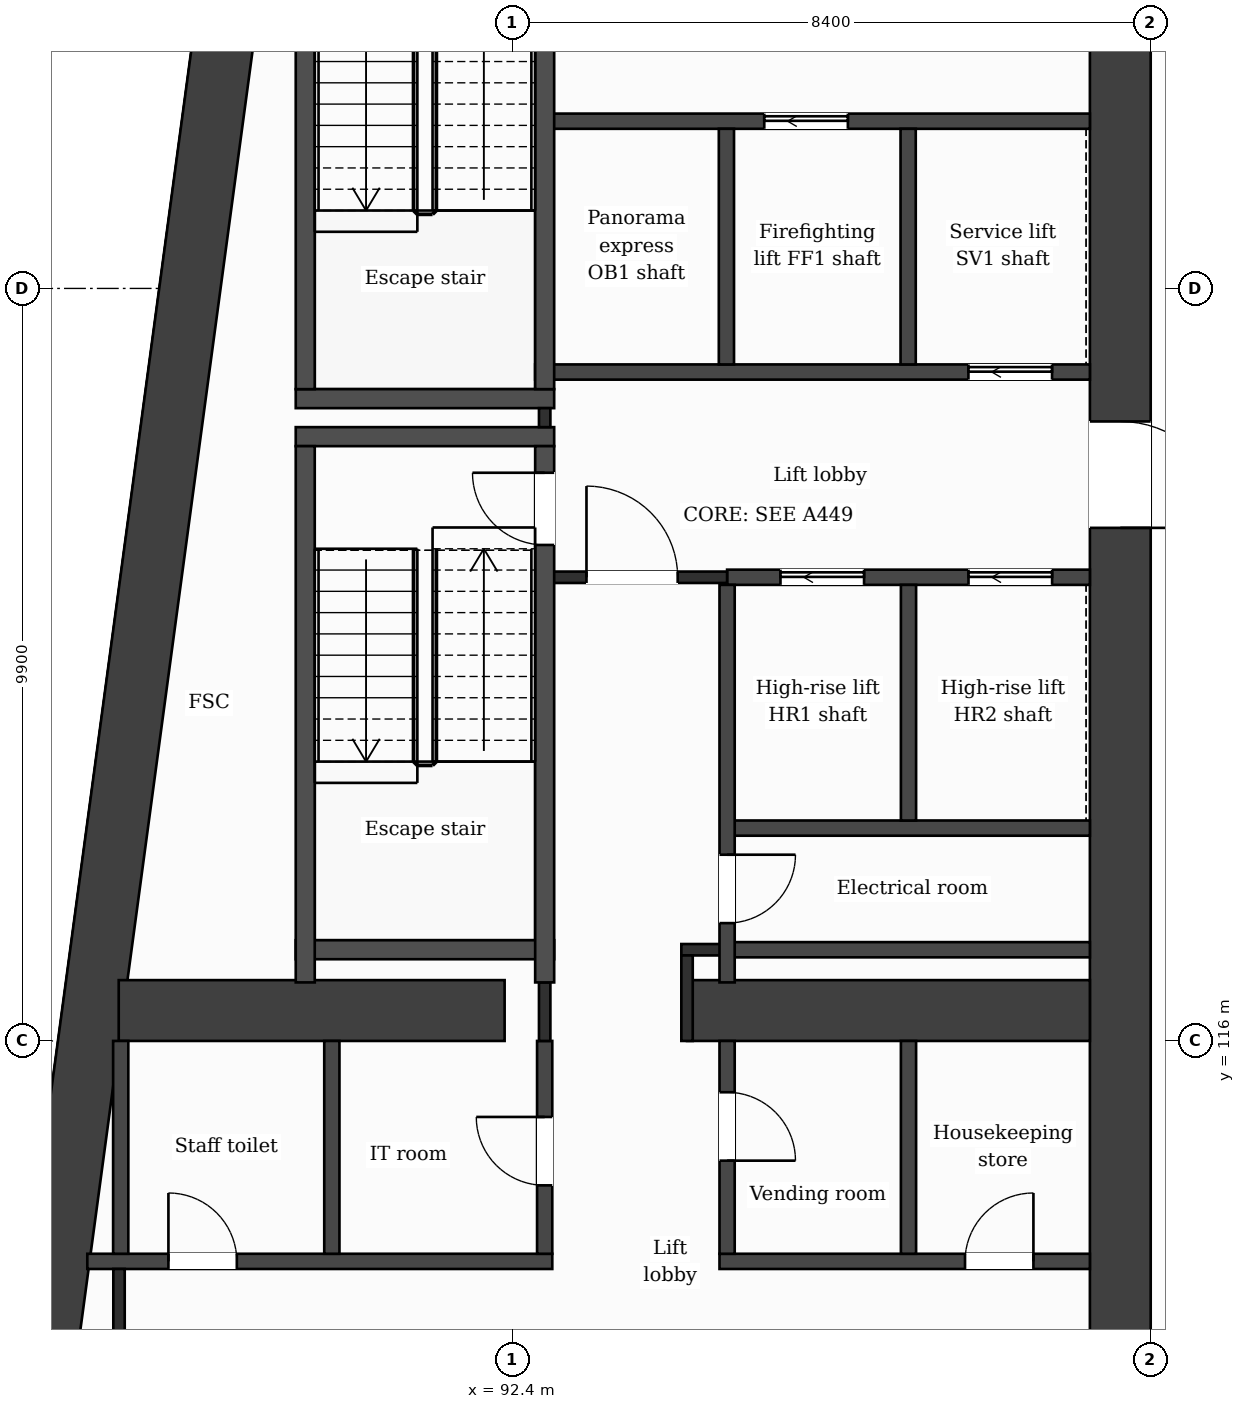
"""IFC4 building model, lengths in metres.
Left out: names, types, materials, properties, quantities, classifications, styles, units other than length and angle.
Written with IfcOpenShell. Run it as: python <this file> out.ifc"""

import sys

from ifc_helpers import new_model, si_unit, direction, frame, frame_2d, origin, place, context, subcontext, project, spatial, rectangle, extrude, element, fill, save


model = new_model("IFC4")
c1 = context("Model", 3, precision=1e-05, world=origin(), true_north=direction((0.0, 1.0)))
c2 = subcontext(c1, "Body", "Model", "MODEL_VIEW")
j1 = project(units=[si_unit("LENGTHUNIT", "METRE"), si_unit("PLANEANGLEUNIT", "RADIAN")], contexts=[c1])
p1 = place(None, origin())
s1 = spatial("IfcSite", under=j1, at=p1, CompositionType="ELEMENT")
p2 = place(p1, origin())
s2 = spatial("IfcBuilding", under=s1, at=p2, CompositionType="ELEMENT")
p3 = place(p2, frame((0.0, 0.0, 202.2)))
s3 = spatial("IfcBuildingStorey", under=s2, at=p3, CompositionType="ELEMENT", Elevation=202.2)
p4 = place(p3, frame((100.4, 132.0, 0.0), z_axis=(0.0, 0.0, 1.0), x_axis=(0.0, -1.0, 0.0)))
e1 = element("IfcWall", 1, at=p4, inside=s3, PredefinedType="SHEAR", context=c2, shape_type="SweptSolid", body=[
    extrude(rectangle(XDim=21.2, YDim=0.8, at=frame_2d((10.6, 0.0))), origin(), (0.0, 0.0, 1.0), 3.7),
])
p5 = place(p4, frame((7.85, 0.0, 0.0)))
e2 = element("IfcOpeningElement", 2, at=p5, cuts=e1, PredefinedType="OPENING", context=c2, shape_type="SweptSolid", body=[
    extrude(rectangle(XDim=1.4, YDim=2.1, at=frame_2d((0.7, 1.05))), frame((0.0, 0.41, 0.0), z_axis=(0.0, -1.0, 0.0), x_axis=(1.0, 0.0, 0.0)), (0.0, 0.0, 1.0), 0.82),
])
p6 = place(p3, frame((86.127, 110.8, 0.0), z_axis=(0.0, 0.0, 1.0), x_axis=(0.133408347329, 0.991061154956, 0.0)))
e3 = element("IfcWall", 3, at=p6, inside=s3, PredefinedType="SHEAR", context=c2, shape_type="SweptSolid", body=[
    extrude(rectangle(XDim=21.391, YDim=0.8, at=frame_2d((10.696, 0.0))), origin(), (0.0, 0.0, 1.0), 3.7),
])
p7 = place(p3, frame((87.223, 116.4, 0.0), z_axis=(0.0, 0.0, 1.0), x_axis=(1.0, 0.0, 0.0)))
e4 = element("IfcWall", 4, at=p7, inside=s3, PredefinedType="SHEAR", context=c2, shape_type="SweptSolid", body=[
    extrude(rectangle(XDim=5.077, YDim=0.8, at=frame_2d((2.539, 0.0))), origin(), (0.0, 0.0, 1.0), 3.7),
])
p8 = place(p3, frame((94.7, 116.4, 0.0), z_axis=(0.0, 0.0, 1.0), x_axis=(1.0, 0.0, 0.0)))
e5 = element("IfcWall", 5, at=p8, inside=s3, PredefinedType="SHEAR", context=c2, shape_type="SweptSolid", body=[
    extrude(rectangle(XDim=5.3, YDim=0.8, at=frame_2d((2.65, 0.0))), origin(), (0.0, 0.0, 1.0), 3.7),
])
p9 = place(p3, frame((86.81, 113.1, 0.0), z_axis=(0.0, 0.0, 1.0), x_axis=(1.0, 0.0, 0.0)))
e6 = element("IfcWall", 6, at=p9, inside=s3, PredefinedType="PARTITIONING", context=c2, shape_type="SweptSolid", body=[
    extrude(rectangle(XDim=6.117, YDim=0.2, at=frame_2d((3.059, 0.0))), origin(), (0.0, 0.0, 1.0), 3.38),
])
p10 = place(p9, frame((1.067, 0.0, 0.0)))
e7 = element("IfcOpeningElement", 7, at=p10, cuts=e6, PredefinedType="OPENING", context=c2, shape_type="SweptSolid", body=[
    extrude(rectangle(XDim=0.9, YDim=2.1, at=frame_2d((0.45, 1.05))), frame((0.0, 0.11, 0.0), z_axis=(0.0, -1.0, 0.0), x_axis=(1.0, 0.0, 0.0)), (0.0, 0.0, 1.0), 0.22),
])
p11 = place(p3, frame((95.127, 113.1, 0.0), z_axis=(0.0, 0.0, 1.0), x_axis=(1.0, 0.0, 0.0)))
e8 = element("IfcWall", 8, at=p11, inside=s3, PredefinedType="PARTITIONING", context=c2, shape_type="SweptSolid", body=[
    extrude(rectangle(XDim=4.873, YDim=0.2, at=frame_2d((2.437, 0.0))), origin(), (0.0, 0.0, 1.0), 3.38),
])
p12 = place(p11, frame((3.23, 0.0, 0.0)))
e9 = element("IfcOpeningElement", 9, at=p12, cuts=e8, PredefinedType="OPENING", context=c2, shape_type="SweptSolid", body=[
    extrude(rectangle(XDim=0.9, YDim=2.1, at=frame_2d((0.45, 1.05))), frame((0.0, 0.11, 0.0), z_axis=(0.0, -1.0, 0.0), x_axis=(1.0, 0.0, 0.0)), (0.0, 0.0, 1.0), 0.22),
])
p13 = place(p3, frame((95.227, 117.2, 0.0), z_axis=(0.0, 0.0, 1.0), x_axis=(1.0, 0.0, 0.0)))
e10 = element("IfcWall", 10, at=p13, inside=s3, PredefinedType="PARTITIONING", context=c2, shape_type="SweptSolid", body=[
    extrude(rectangle(XDim=4.773, YDim=0.2, at=frame_2d((2.386, 0.0))), origin(), (0.0, 0.0, 1.0), 3.38),
])
p14 = place(p3, frame((94.625, 117.2, 0.0), z_axis=(0.0, 0.0, 1.0), x_axis=(1.0, 0.0, 0.0)))
e11 = element("IfcWall", 11, at=p14, inside=s3, PredefinedType="PARTITIONING", context=c2, shape_type="SweptSolid", body=[
    extrude(rectangle(XDim=0.602, YDim=0.15, at=frame_2d((0.301, 0.0))), origin(), (0.0, 0.0, 1.0), 3.38),
])
p15 = place(p3, frame((89.552, 117.2, 0.0), z_axis=(0.0, 0.0, 1.0), x_axis=(1.0, 0.0, 0.0)))
e12 = element("IfcWall", 12, at=p15, inside=s3, PredefinedType="PARTITIONING", context=c2, shape_type="SweptSolid", body=[
    extrude(rectangle(XDim=3.4, YDim=0.25, at=frame_2d((1.7, 0.0))), origin(), (0.0, 0.0, 1.0), 3.38),
])
p16 = place(p3, frame((95.227, 118.8, 0.0), z_axis=(0.0, 0.0, 1.0), x_axis=(1.0, 0.0, 0.0)))
e13 = element("IfcWall", 13, at=p16, inside=s3, PredefinedType="PARTITIONING", context=c2, shape_type="SweptSolid", body=[
    extrude(rectangle(XDim=4.773, YDim=0.2, at=frame_2d((2.386, 0.0))), origin(), (0.0, 0.0, 1.0), 3.38),
])
p17 = place(p3, frame((95.227, 122.1, 0.0), z_axis=(0.0, 0.0, 1.0), x_axis=(1.0, 0.0, 0.0)))
e14 = element("IfcWall", 14, at=p17, inside=s3, PredefinedType="PARTITIONING", context=c2, shape_type="SweptSolid", body=[
    extrude(rectangle(XDim=4.773, YDim=0.2, at=frame_2d((2.386, 0.0))), origin(), (0.0, 0.0, 1.0), 3.38),
])
p18 = place(p17, frame((0.702, 0.0, 0.0)))
e15 = element("IfcOpeningElement", 15, at=p18, cuts=e14, PredefinedType="OPENING", context=c2, shape_type="SweptSolid", body=[
    extrude(rectangle(XDim=1.1, YDim=2.1, at=frame_2d((0.55, 1.05))), frame((0.0, 0.11, 0.0), z_axis=(0.0, -1.0, 0.0), x_axis=(1.0, 0.0, 0.0)), (0.0, 0.0, 1.0), 0.22),
])
p19 = place(p17, frame((3.176, 0.0, 0.0)))
e16 = element("IfcOpeningElement", 16, at=p19, cuts=e14, PredefinedType="OPENING", context=c2, shape_type="SweptSolid", body=[
    extrude(rectangle(XDim=1.1, YDim=2.1, at=frame_2d((0.55, 1.05))), frame((0.0, 0.11, 0.0), z_axis=(0.0, -1.0, 0.0), x_axis=(1.0, 0.0, 0.0)), (0.0, 0.0, 1.0), 0.22),
])
p20 = place(p3, frame((92.827, 122.1, 0.0), z_axis=(0.0, 0.0, 1.0), x_axis=(1.0, 0.0, 0.0)))
e17 = element("IfcWall", 17, at=p20, inside=s3, PredefinedType="PARTITIONING", context=c2, shape_type="SweptSolid", body=[
    extrude(rectangle(XDim=2.4, YDim=0.15, at=frame_2d((1.2, 0.0))), origin(), (0.0, 0.0, 1.0), 3.38),
])
p21 = place(p20, frame((0.55, 0.0, 0.0)))
e18 = element("IfcOpeningElement", 18, at=p21, cuts=e17, PredefinedType="OPENING", context=c2, shape_type="SweptSolid", body=[
    extrude(rectangle(XDim=1.2, YDim=2.1, at=frame_2d((0.6, 1.05))), frame((0.0, 0.085, 0.0), z_axis=(0.0, -1.0, 0.0), x_axis=(1.0, 0.0, 0.0)), (0.0, 0.0, 1.0), 0.17),
])
for number, where, z_axis, x_axis in (
    (19, (89.552, 123.95, 0.0), (0.0, 0.0, 1.0), (1.0, 0.0, 0.0)),
    (20, (89.552, 124.45, 0.0), (0.0, 0.0, 1.0), (1.0, 0.0, 0.0)),
):
    element("IfcWall", number, at=place(p3, frame(where, z_axis=z_axis, x_axis=x_axis)), inside=s3, PredefinedType="PARTITIONING", context=c2, shape_type="SweptSolid", body=[
        extrude(rectangle(XDim=3.4, YDim=0.25, at=frame_2d((1.7, 0.0))), origin(), (0.0, 0.0, 1.0), 3.38),
    ])
p22 = place(p3, frame((92.702, 124.8, 0.0), z_axis=(0.0, 0.0, 1.0), x_axis=(1.0, 0.0, 0.0)))
e21 = element("IfcWall", 21, at=p22, inside=s3, PredefinedType="PARTITIONING", context=c2, shape_type="SweptSolid", body=[
    extrude(rectangle(XDim=7.298, YDim=0.2, at=frame_2d((3.649, 0.0))), origin(), (0.0, 0.0, 1.0), 3.38),
])
p23 = place(p22, frame((5.7, 0.0, 0.0)))
e22 = element("IfcOpeningElement", 22, at=p23, cuts=e21, PredefinedType="OPENING", context=c2, shape_type="SweptSolid", body=[
    extrude(rectangle(XDim=1.1, YDim=2.1, at=frame_2d((0.55, 1.05))), frame((0.0, 0.11, 0.0), z_axis=(0.0, -1.0, 0.0), x_axis=(1.0, 0.0, 0.0)), (0.0, 0.0, 1.0), 0.22),
])
p24 = place(p3, frame((92.827, 128.1, 0.0), z_axis=(0.0, 0.0, 1.0), x_axis=(1.0, 0.0, 0.0)))
e23 = element("IfcWall", 23, at=p24, inside=s3, PredefinedType="PARTITIONING", context=c2, shape_type="SweptSolid", body=[
    extrude(rectangle(XDim=7.173, YDim=0.2, at=frame_2d((3.586, 0.0))), origin(), (0.0, 0.0, 1.0), 3.38),
])
p25 = place(p24, frame((2.889, 0.0, 0.0)))
e24 = element("IfcOpeningElement", 24, at=p25, cuts=e23, PredefinedType="OPENING", context=c2, shape_type="SweptSolid", body=[
    extrude(rectangle(XDim=1.1, YDim=2.1, at=frame_2d((0.55, 1.05))), frame((0.0, 0.11, 0.0), z_axis=(0.0, -1.0, 0.0), x_axis=(1.0, 0.0, 0.0)), (0.0, 0.0, 1.0), 0.22),
])
p26 = place(p3, frame((87.25, 113.2, 0.0), z_axis=(0.0, 0.0, 1.0), x_axis=(0.0, 1.0, 0.0)))
e25 = element("IfcWall", 25, at=p26, inside=s3, PredefinedType="PARTITIONING", context=c2, shape_type="SweptSolid", body=[
    extrude(rectangle(XDim=2.8, YDim=0.2, at=frame_2d((1.4, 0.0))), origin(), (0.0, 0.0, 1.0), 3.38),
])
p27 = place(p3, frame((87.227, 111.2, 0.0), z_axis=(0.0, 0.0, 1.0), x_axis=(0.0, 1.0, 0.0)))
e26 = element("IfcWall", 26, at=p27, inside=s3, PredefinedType="PARTITIONING", context=c2, shape_type="SweptSolid", body=[
    extrude(rectangle(XDim=1.8, YDim=0.15, at=frame_2d((0.9, 0.0))), origin(), (0.0, 0.0, 1.0), 3.38),
])
for number, where, z_axis, x_axis in (
    (27, (89.677, 116.77, 0.0), (0.0, 0.0, 1.0), (0.0, 1.0, 0.0)),
    (28, (89.677, 124.575, 0.0), (0.0, 0.0, 1.0), (0.0, 1.0, 0.0)),
):
    element("IfcWall", number, at=place(p3, frame(where, z_axis=z_axis, x_axis=x_axis)), inside=s3, PredefinedType="PARTITIONING", context=c2, shape_type="SweptSolid", body=[
        extrude(rectangle(XDim=7.055, YDim=0.25, at=frame_2d((3.527, 0.0))), origin(), (0.0, 0.0, 1.0), 3.38),
    ])
p28 = place(p3, frame((90.027, 113.2, 0.0), z_axis=(0.0, 0.0, 1.0), x_axis=(0.0, 1.0, 0.0)))
e29 = element("IfcWall", 29, at=p28, inside=s3, PredefinedType="PARTITIONING", context=c2, shape_type="SweptSolid", body=[
    extrude(rectangle(XDim=2.8, YDim=0.2, at=frame_2d((1.4, 0.0))), origin(), (0.0, 0.0, 1.0), 3.38),
])
p29 = place(p3, frame((92.827, 113.2, 0.0), z_axis=(0.0, 0.0, 1.0), x_axis=(0.0, 1.0, 0.0)))
e30 = element("IfcWall", 30, at=p29, inside=s3, PredefinedType="PARTITIONING", context=c2, shape_type="SweptSolid", body=[
    extrude(rectangle(XDim=2.8, YDim=0.2, at=frame_2d((1.4, 0.0))), origin(), (0.0, 0.0, 1.0), 3.38),
])
p30 = place(p29, frame((0.9, 0.0, 0.0)))
e31 = element("IfcOpeningElement", 31, at=p30, cuts=e30, PredefinedType="OPENING", context=c2, shape_type="SweptSolid", body=[
    extrude(rectangle(XDim=0.9, YDim=2.1, at=frame_2d((0.45, 1.05))), frame((0.0, 0.11, 0.0), z_axis=(0.0, -1.0, 0.0), x_axis=(1.0, 0.0, 0.0)), (0.0, 0.0, 1.0), 0.22),
])
p31 = place(p3, frame((92.827, 116.0, 0.0), z_axis=(0.0, 0.0, 1.0), x_axis=(0.0, 1.0, 0.0)))
e32 = element("IfcWall", 32, at=p31, inside=s3, PredefinedType="PARTITIONING", context=c2, shape_type="SweptSolid", body=[
    extrude(rectangle(XDim=0.77, YDim=0.15, at=frame_2d((0.385, 0.0))), origin(), (0.0, 0.0, 1.0), 3.38),
])
p32 = place(p3, frame((92.827, 124.075, 0.0), z_axis=(0.0, 0.0, 1.0), x_axis=(0.0, 1.0, 0.0)))
e33 = element("IfcWall", 33, at=p32, inside=s3, PredefinedType="PARTITIONING", context=c2, shape_type="SweptSolid", body=[
    extrude(rectangle(XDim=0.25, YDim=0.15, at=frame_2d((0.125, 0.0))), origin(), (0.0, 0.0, 1.0), 3.38),
])
p33 = place(p3, frame((92.827, 116.77, 0.0), z_axis=(0.0, 0.0, 1.0), x_axis=(0.0, 1.0, 0.0)))
e34 = element("IfcWall", 34, at=p33, inside=s3, PredefinedType="PARTITIONING", context=c2, shape_type="SweptSolid", body=[
    extrude(rectangle(XDim=7.055, YDim=0.25, at=frame_2d((3.527, 0.0))), origin(), (0.0, 0.0, 1.0), 3.38),
])
p34 = place(p33, frame((5.755, 0.0, 0.0)))
e35 = element("IfcOpeningElement", 35, at=p34, cuts=e34, PredefinedType="OPENING", context=c2, shape_type="SweptSolid", body=[
    extrude(rectangle(XDim=0.95, YDim=2.1, at=frame_2d((0.475, 1.05))), frame((0.0, 0.135, 0.0), z_axis=(0.0, -1.0, 0.0), x_axis=(1.0, 0.0, 0.0)), (0.0, 0.0, 1.0), 0.27),
])
p35 = place(p3, frame((92.827, 124.575, 0.0), z_axis=(0.0, 0.0, 1.0), x_axis=(0.0, 1.0, 0.0)))
e36 = element("IfcWall", 36, at=p35, inside=s3, PredefinedType="PARTITIONING", context=c2, shape_type="SweptSolid", body=[
    extrude(rectangle(XDim=7.055, YDim=0.25, at=frame_2d((3.527, 0.0))), origin(), (0.0, 0.0, 1.0), 3.38),
])
p36 = place(p35, frame((5.325, 0.0, 0.0)))
e37 = element("IfcOpeningElement", 37, at=p36, cuts=e36, PredefinedType="OPENING", context=c2, shape_type="SweptSolid", body=[
    extrude(rectangle(XDim=1.0, YDim=2.1, at=frame_2d((0.5, 1.05))), frame((0.0, 0.135, 0.0), z_axis=(0.0, -1.0, 0.0), x_axis=(1.0, 0.0, 0.0)), (0.0, 0.0, 1.0), 0.27),
])
p37 = place(p3, frame((94.7, 116.0, 0.0), z_axis=(0.0, 0.0, 1.0), x_axis=(0.0, 1.0, 0.0)))
e38 = element("IfcWall", 38, at=p37, inside=s3, PredefinedType="PARTITIONING", context=c2, shape_type="SweptSolid", body=[
    extrude(rectangle(XDim=1.125, YDim=0.15, at=frame_2d((0.562, 0.0))), origin(), (0.0, 0.0, 1.0), 3.38),
])
p38 = place(p3, frame((95.218, 124.9, 0.0), z_axis=(0.0, 0.0, 1.0), x_axis=(0.0, 1.0, 0.0)))
e39 = element("IfcWall", 39, at=p38, inside=s3, PredefinedType="PARTITIONING", context=c2, shape_type="SweptSolid", body=[
    extrude(rectangle(XDim=3.1, YDim=0.2, at=frame_2d((1.55, 0.0))), origin(), (0.0, 0.0, 1.0), 3.38),
])
p39 = place(p3, frame((95.227, 113.2, 0.0), z_axis=(0.0, 0.0, 1.0), x_axis=(0.0, 1.0, 0.0)))
e40 = element("IfcWall", 40, at=p39, inside=s3, PredefinedType="PARTITIONING", context=c2, shape_type="SweptSolid", body=[
    extrude(rectangle(XDim=2.8, YDim=0.2, at=frame_2d((1.4, 0.0))), origin(), (0.0, 0.0, 1.0), 3.38),
])
p40 = place(p39, frame((1.225, 0.0, 0.0)))
e41 = element("IfcOpeningElement", 41, at=p40, cuts=e40, PredefinedType="OPENING", context=c2, shape_type="SweptSolid", body=[
    extrude(rectangle(XDim=0.9, YDim=2.1, at=frame_2d((0.45, 1.05))), frame((0.0, 0.11, 0.0), z_axis=(0.0, -1.0, 0.0), x_axis=(1.0, 0.0, 0.0)), (0.0, 0.0, 1.0), 0.22),
])
p41 = place(p3, frame((95.227, 116.77, 0.0), z_axis=(0.0, 0.0, 1.0), x_axis=(0.0, 1.0, 0.0)))
e42 = element("IfcWall", 42, at=p41, inside=s3, PredefinedType="PARTITIONING", context=c2, shape_type="SweptSolid", body=[
    extrude(rectangle(XDim=5.23, YDim=0.2, at=frame_2d((2.615, 0.0))), origin(), (0.0, 0.0, 1.0), 3.38),
])
p42 = place(p41, frame((0.78, 0.0, 0.0)))
e43 = element("IfcOpeningElement", 43, at=p42, cuts=e42, PredefinedType="OPENING", context=c2, shape_type="SweptSolid", body=[
    extrude(rectangle(XDim=0.9, YDim=2.1, at=frame_2d((0.45, 1.05))), frame((0.0, 0.11, 0.0), z_axis=(0.0, -1.0, 0.0), x_axis=(1.0, 0.0, 0.0)), (0.0, 0.0, 1.0), 0.22),
])
p43 = place(p3, frame((97.609, 124.9, 0.0), z_axis=(0.0, 0.0, 1.0), x_axis=(0.0, 1.0, 0.0)))
e44 = element("IfcWall", 44, at=p43, inside=s3, PredefinedType="PARTITIONING", context=c2, shape_type="SweptSolid", body=[
    extrude(rectangle(XDim=3.1, YDim=0.2, at=frame_2d((1.55, 0.0))), origin(), (0.0, 0.0, 1.0), 3.38),
])
p44 = place(p3, frame((97.614, 113.2, 0.0), z_axis=(0.0, 0.0, 1.0), x_axis=(0.0, 1.0, 0.0)))
e45 = element("IfcWall", 45, at=p44, inside=s3, PredefinedType="PARTITIONING", context=c2, shape_type="SweptSolid", body=[
    extrude(rectangle(XDim=2.8, YDim=0.2, at=frame_2d((1.4, 0.0))), origin(), (0.0, 0.0, 1.0), 3.38),
])
p45 = place(p3, frame((97.614, 118.9, 0.0), z_axis=(0.0, 0.0, 1.0), x_axis=(0.0, 1.0, 0.0)))
e46 = element("IfcWall", 46, at=p45, inside=s3, PredefinedType="PARTITIONING", context=c2, shape_type="SweptSolid", body=[
    extrude(rectangle(XDim=3.1, YDim=0.2, at=frame_2d((1.55, 0.0))), origin(), (0.0, 0.0, 1.0), 3.38),
])
p46 = place(p21, origin())
e47 = element("IfcDoor", 47, at=p46, inside=s3, OperationType="SINGLE_SWING_LEFT", PredefinedType="DOOR", context=c2, shape_type="SweptSolid", body=[
    extrude(rectangle(XDim=1.2, YDim=2.1, at=frame_2d((0.6, 1.05))), frame((0.0, 0.025, 0.0), z_axis=(0.0, -1.0, 0.0), x_axis=(1.0, 0.0, 0.0)), (0.0, 0.0, 1.0), 0.05),
])
fill(e18, e47)
p47 = place(p18, origin())
e48 = element("IfcDoor", 48, at=p47, inside=s3, OperationType="SLIDING_TO_LEFT", PredefinedType="DOOR", context=c2, shape_type="SweptSolid", body=[
    extrude(rectangle(XDim=1.1, YDim=2.1, at=frame_2d((0.55, 1.05))), frame((0.0, 0.025, 0.0), z_axis=(0.0, -1.0, 0.0), x_axis=(1.0, 0.0, 0.0)), (0.0, 0.0, 1.0), 0.05),
])
fill(e15, e48)
p48 = place(p19, origin())
e49 = element("IfcDoor", 49, at=p48, inside=s3, OperationType="SLIDING_TO_LEFT", PredefinedType="DOOR", context=c2, shape_type="SweptSolid", body=[
    extrude(rectangle(XDim=1.1, YDim=2.1, at=frame_2d((0.55, 1.05))), frame((0.0, 0.025, 0.0), z_axis=(0.0, -1.0, 0.0), x_axis=(1.0, 0.0, 0.0)), (0.0, 0.0, 1.0), 0.05),
])
fill(e16, e49)
p49 = place(p25, origin())
e50 = element("IfcDoor", 50, at=p49, inside=s3, OperationType="SLIDING_TO_LEFT", PredefinedType="DOOR", context=c2, shape_type="SweptSolid", body=[
    extrude(rectangle(XDim=1.1, YDim=2.1, at=frame_2d((0.55, 1.05))), frame((0.0, 0.025, 0.0), z_axis=(0.0, -1.0, 0.0), x_axis=(1.0, 0.0, 0.0)), (0.0, 0.0, 1.0), 0.05),
])
fill(e24, e50)
p50 = place(p23, origin())
e51 = element("IfcDoor", 51, at=p50, inside=s3, OperationType="SLIDING_TO_LEFT", PredefinedType="DOOR", context=c2, shape_type="SweptSolid", body=[
    extrude(rectangle(XDim=1.1, YDim=2.1, at=frame_2d((0.55, 1.05))), frame((0.0, 0.025, 0.0), z_axis=(0.0, -1.0, 0.0), x_axis=(1.0, 0.0, 0.0)), (0.0, 0.0, 1.0), 0.05),
])
fill(e22, e51)
p51 = place(p34, origin())
e52 = element("IfcDoor", 52, at=p51, inside=s3, OperationType="SINGLE_SWING_RIGHT", PredefinedType="DOOR", context=c2, shape_type="SweptSolid", body=[
    extrude(rectangle(XDim=0.95, YDim=2.1, at=frame_2d((0.475, 1.05))), frame((0.0, 0.025, 0.0), z_axis=(0.0, -1.0, 0.0), x_axis=(1.0, 0.0, 0.0)), (0.0, 0.0, 1.0), 0.05),
])
fill(e35, e52)
p52 = place(p42, origin())
e53 = element("IfcDoor", 53, at=p52, inside=s3, OperationType="SINGLE_SWING_RIGHT", PredefinedType="DOOR", context=c2, shape_type="SweptSolid", body=[
    extrude(rectangle(XDim=0.9, YDim=2.1, at=frame_2d((0.45, 1.05))), frame((0.0, 0.025, 0.0), z_axis=(0.0, -1.0, 0.0), x_axis=(1.0, 0.0, 0.0)), (0.0, 0.0, 1.0), 0.05),
])
fill(e43, e53)
p53 = place(p10, origin())
e54 = element("IfcDoor", 54, at=p53, inside=s3, OperationType="SINGLE_SWING_LEFT", PredefinedType="DOOR", context=c2, shape_type="SweptSolid", body=[
    extrude(rectangle(XDim=0.9, YDim=2.1, at=frame_2d((0.45, 1.05))), frame((0.0, 0.025, 0.0), z_axis=(0.0, -1.0, 0.0), x_axis=(1.0, 0.0, 0.0)), (0.0, 0.0, 1.0), 0.05),
])
fill(e7, e54)
p54 = place(p30, origin())
e55 = element("IfcDoor", 55, at=p54, inside=s3, OperationType="SINGLE_SWING_RIGHT", PredefinedType="DOOR", context=c2, shape_type="SweptSolid", body=[
    extrude(rectangle(XDim=0.9, YDim=2.1, at=frame_2d((0.45, 1.05))), frame((0.0, 0.025, 0.0), z_axis=(0.0, -1.0, 0.0), x_axis=(1.0, 0.0, 0.0)), (0.0, 0.0, 1.0), 0.05),
])
fill(e31, e55)
p55 = place(p40, origin())
e56 = element("IfcDoor", 56, at=p55, inside=s3, OperationType="SINGLE_SWING_LEFT", PredefinedType="DOOR", context=c2, shape_type="SweptSolid", body=[
    extrude(rectangle(XDim=0.9, YDim=2.1, at=frame_2d((0.45, 1.05))), frame((0.0, 0.025, 0.0), z_axis=(0.0, -1.0, 0.0), x_axis=(1.0, 0.0, 0.0)), (0.0, 0.0, 1.0), 0.05),
])
fill(e41, e56)
p56 = place(p12, origin())
e57 = element("IfcDoor", 57, at=p56, inside=s3, OperationType="SINGLE_SWING_RIGHT", PredefinedType="DOOR", context=c2, shape_type="SweptSolid", body=[
    extrude(rectangle(XDim=0.9, YDim=2.1, at=frame_2d((0.45, 1.05))), frame((0.0, 0.025, 0.0), z_axis=(0.0, -1.0, 0.0), x_axis=(1.0, 0.0, 0.0)), (0.0, 0.0, 1.0), 0.05),
])
fill(e9, e57)
p57 = place(p5, origin())
e58 = element("IfcDoor", 58, at=p57, inside=s3, OperationType="SINGLE_SWING_RIGHT", PredefinedType="DOOR", context=c2, shape_type="SweptSolid", body=[
    extrude(rectangle(XDim=1.4, YDim=2.1, at=frame_2d((0.7, 1.05))), frame((0.0, 0.025, 0.0), z_axis=(0.0, -1.0, 0.0), x_axis=(1.0, 0.0, 0.0)), (0.0, 0.0, 1.0), 0.05),
])
fill(e2, e58)
save(model, sys.argv[1])
